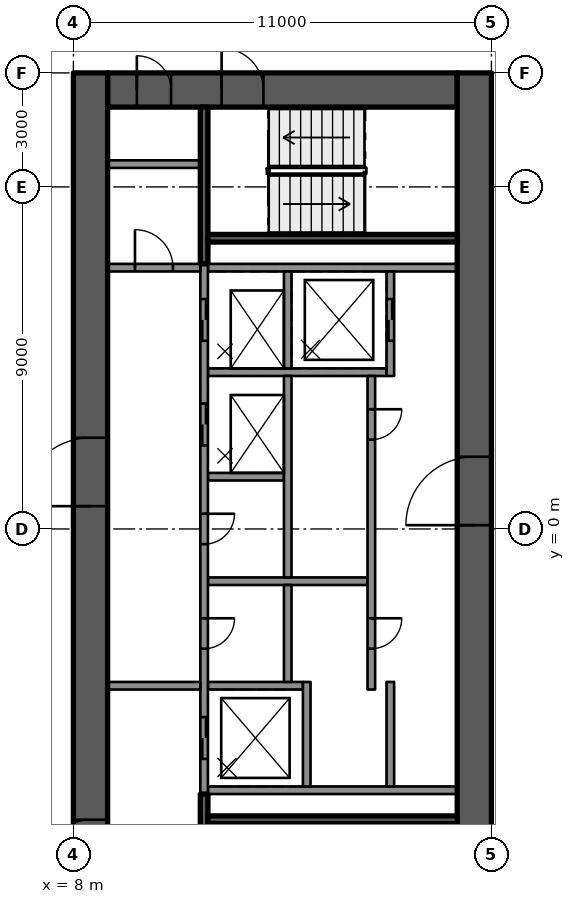
"""IFC4 building model, lengths in metres.
Left out: names, types, materials, properties, quantities, classifications, styles, units other than length and angle.
Written with IfcOpenShell. Run it as: python <this file> out.ifc"""

import sys

from ifc_helpers import new_model, si_unit, direction, frame, frame_2d, origin, place, context, subcontext, project, spatial, rectangle, extrude, element, fill, save


model = new_model("IFC4")
c1 = context("Model", 3, precision=1e-05, world=origin(), true_north=direction((0.0, 1.0)))
c2 = subcontext(c1, "Body", "Model", "MODEL_VIEW")
j1 = project(units=[si_unit("LENGTHUNIT", "METRE"), si_unit("PLANEANGLEUNIT", "RADIAN")], contexts=[c1])
p1 = place(None, origin())
s1 = spatial("IfcSite", under=j1, at=p1, CompositionType="ELEMENT")
p2 = place(p1, origin())
s2 = spatial("IfcBuilding", under=s1, at=p2, CompositionType="ELEMENT")
p3 = place(p2, frame((0.0, 0.0, 285.9)))
s3 = spatial("IfcBuildingStorey", under=s2, at=p3, CompositionType="ELEMENT", Elevation=285.9)
p4 = place(p3, frame((8.9, 11.55, 0.0), z_axis=(0.0, 0.0, 1.0), x_axis=(1.0, 0.0, 0.0)))
e1 = element("IfcWall", 1, at=p4, inside=s3, PredefinedType="SHEAR", context=c2, shape_type="SweptSolid", body=[
    extrude(rectangle(XDim=9.2, YDim=0.9, at=frame_2d((4.6, 0.0))), origin(), (0.0, 0.0, 1.0), 3.5),
])
p5 = place(p4, frame((3.0, 0.0, 0.0)))
e2 = element("IfcOpeningElement", 2, at=p5, cuts=e1, PredefinedType="OPENING", context=c2, shape_type="SweptSolid", body=[
    extrude(rectangle(XDim=1.1, YDim=2.1, at=frame_2d((0.55, 1.05))), frame((0.0, 0.46, 0.0), z_axis=(0.0, -1.0, 0.0), x_axis=(1.0, 0.0, 0.0)), (0.0, 0.0, 1.0), 0.92),
])
p6 = place(p4, frame((0.77, 0.0, 0.0)))
e3 = element("IfcOpeningElement", 3, at=p6, cuts=e1, PredefinedType="OPENING", context=c2, shape_type="SweptSolid", body=[
    extrude(rectangle(XDim=0.9, YDim=2.1, at=frame_2d((0.45, 1.05))), frame((0.0, 0.46, 0.0), z_axis=(0.0, -1.0, 0.0), x_axis=(1.0, 0.0, 0.0)), (0.0, 0.0, 1.0), 0.92),
])
p7 = place(p3, frame((8.45, -12.0, 0.0), z_axis=(0.0, 0.0, 1.0), x_axis=(0.0, 1.0, 0.0)))
e4 = element("IfcWall", 4, at=p7, inside=s3, PredefinedType="SHEAR", context=c2, shape_type="SweptSolid", body=[
    extrude(rectangle(XDim=24.0, YDim=0.9, at=frame_2d((12.0, 0.0))), origin(), (0.0, 0.0, 1.0), 3.5),
])
p8 = place(p7, frame((12.6, 0.0, 0.0)))
e5 = element("IfcOpeningElement", 5, at=p8, cuts=e4, PredefinedType="OPENING", context=c2, shape_type="SweptSolid", body=[
    extrude(rectangle(XDim=1.8, YDim=2.1, at=frame_2d((0.9, 1.05))), frame((0.0, 0.46, 0.0), z_axis=(0.0, -1.0, 0.0), x_axis=(1.0, 0.0, 0.0)), (0.0, 0.0, 1.0), 0.92),
])
p9 = place(p7, frame((3.25, 0.0, 0.0)))
e6 = element("IfcOpeningElement", 6, at=p9, cuts=e4, PredefinedType="OPENING", context=c2, shape_type="SweptSolid", body=[
    extrude(rectangle(XDim=1.1, YDim=2.1, at=frame_2d((0.55, 1.05))), frame((0.0, 0.46, 0.0), z_axis=(0.0, -1.0, 0.0), x_axis=(1.0, 0.0, 0.0)), (0.0, 0.0, 1.0), 0.92),
])
p10 = place(p3, frame((18.55, -12.0, 0.0), z_axis=(0.0, 0.0, 1.0), x_axis=(0.0, 1.0, 0.0)))
e7 = element("IfcWall", 7, at=p10, inside=s3, PredefinedType="SHEAR", context=c2, shape_type="SweptSolid", body=[
    extrude(rectangle(XDim=24.0, YDim=0.9, at=frame_2d((12.0, 0.0))), origin(), (0.0, 0.0, 1.0), 3.5),
])
p11 = place(p10, frame((12.1, 0.0, 0.0)))
e8 = element("IfcOpeningElement", 8, at=p11, cuts=e7, PredefinedType="OPENING", context=c2, shape_type="SweptSolid", body=[
    extrude(rectangle(XDim=1.8, YDim=2.1, at=frame_2d((0.9, 1.05))), frame((0.0, 0.46, 0.0), z_axis=(0.0, -1.0, 0.0), x_axis=(1.0, 0.0, 0.0)), (0.0, 0.0, 1.0), 0.92),
])
for number, where, z_axis, x_axis in (
    (9, (11.54, -6.875, 0.0), (0.0, 0.0, 1.0), (1.0, 0.0, 0.0)),
    (10, (11.54, 6.875, 0.0), (0.0, 0.0, 1.0), (1.0, 0.0, 0.0)),
):
    element("IfcWall", number, at=place(p3, frame(where, z_axis=z_axis, x_axis=x_axis)), inside=s3, PredefinedType="SOLIDWALL", context=c2, shape_type="SweptSolid", body=[
        extrude(rectangle(XDim=6.56, YDim=0.2, at=frame_2d((3.28, 0.0))), origin(), (0.0, 0.0, 1.0), 3.09),
    ])
p12 = place(p3, frame((11.54, 4.125, 0.0), z_axis=(0.0, 0.0, 1.0), x_axis=(1.0, 0.0, 0.0)))
e11 = element("IfcWall", 11, at=p12, inside=s3, PredefinedType="SOLIDWALL", context=c2, shape_type="SweptSolid", body=[
    extrude(rectangle(XDim=4.7, YDim=0.2, at=frame_2d((2.35, 0.0))), origin(), (0.0, 0.0, 1.0), 3.09),
])
p13 = place(p3, frame((11.54, 1.375, 0.0), z_axis=(0.0, 0.0, 1.0), x_axis=(1.0, 0.0, 0.0)))
e12 = element("IfcWall", 12, at=p13, inside=s3, PredefinedType="SOLIDWALL", context=c2, shape_type="SweptSolid", body=[
    extrude(rectangle(XDim=2.0, YDim=0.2, at=frame_2d((1.0, 0.0))), origin(), (0.0, 0.0, 1.0), 3.09),
])
p14 = place(p3, frame((11.54, -1.375, 0.0), z_axis=(0.0, 0.0, 1.0), x_axis=(1.0, 0.0, 0.0)))
e13 = element("IfcWall", 13, at=p14, inside=s3, PredefinedType="SOLIDWALL", context=c2, shape_type="SweptSolid", body=[
    extrude(rectangle(XDim=4.2, YDim=0.2, at=frame_2d((2.1, 0.0))), origin(), (0.0, 0.0, 1.0), 3.09),
])
p15 = place(p3, frame((11.54, -4.125, 0.0), z_axis=(0.0, 0.0, 1.0), x_axis=(1.0, 0.0, 0.0)))
e14 = element("IfcWall", 14, at=p15, inside=s3, PredefinedType="SOLIDWALL", context=c2, shape_type="SweptSolid", body=[
    extrude(rectangle(XDim=2.5, YDim=0.2, at=frame_2d((1.25, 0.0))), origin(), (0.0, 0.0, 1.0), 3.09),
])
p16 = place(p3, frame((11.44, 6.975, 0.0), z_axis=(0.0, 0.0, 1.0), x_axis=(0.0, -1.0, 0.0)))
e15 = element("IfcWall", 15, at=p16, inside=s3, PredefinedType="SOLIDWALL", context=c2, shape_type="SweptSolid", body=[
    extrude(rectangle(XDim=13.95, YDim=0.2, at=frame_2d((6.975, 0.0))), origin(), (0.0, 0.0, 1.0), 3.09),
])
p17 = place(p16, frame((0.925, 0.0, 0.0)))
e16 = element("IfcOpeningElement", 16, at=p17, cuts=e15, PredefinedType="OPENING", context=c2, shape_type="SweptSolid", body=[
    extrude(rectangle(XDim=1.1, YDim=2.1, at=frame_2d((0.55, 1.05))), frame((0.0, 0.11, 0.0), z_axis=(0.0, -1.0, 0.0), x_axis=(1.0, 0.0, 0.0)), (0.0, 0.0, 1.0), 0.22),
])
p18 = place(p16, frame((3.675, 0.0, 0.0)))
e17 = element("IfcOpeningElement", 17, at=p18, cuts=e15, PredefinedType="OPENING", context=c2, shape_type="SweptSolid", body=[
    extrude(rectangle(XDim=1.1, YDim=2.1, at=frame_2d((0.55, 1.05))), frame((0.0, 0.11, 0.0), z_axis=(0.0, -1.0, 0.0), x_axis=(1.0, 0.0, 0.0)), (0.0, 0.0, 1.0), 0.22),
])
p19 = place(p16, frame((11.925, 0.0, 0.0)))
e18 = element("IfcOpeningElement", 18, at=p19, cuts=e15, PredefinedType="OPENING", context=c2, shape_type="SweptSolid", body=[
    extrude(rectangle(XDim=1.1, YDim=2.1, at=frame_2d((0.55, 1.05))), frame((0.0, 0.11, 0.0), z_axis=(0.0, -1.0, 0.0), x_axis=(1.0, 0.0, 0.0)), (0.0, 0.0, 1.0), 0.22),
])
p20 = place(p16, frame((6.575, 0.0, 0.0)))
e19 = element("IfcOpeningElement", 19, at=p20, cuts=e15, PredefinedType="OPENING", context=c2, shape_type="SweptSolid", body=[
    extrude(rectangle(XDim=0.8, YDim=2.1, at=frame_2d((0.4, 1.05))), frame((0.0, 0.11, 0.0), z_axis=(0.0, -1.0, 0.0), x_axis=(1.0, 0.0, 0.0)), (0.0, 0.0, 1.0), 0.22),
])
p21 = place(p16, frame((9.325, 0.0, 0.0)))
e20 = element("IfcOpeningElement", 20, at=p21, cuts=e15, PredefinedType="OPENING", context=c2, shape_type="SweptSolid", body=[
    extrude(rectangle(XDim=0.8, YDim=2.1, at=frame_2d((0.4, 1.05))), frame((0.0, 0.11, 0.0), z_axis=(0.0, -1.0, 0.0), x_axis=(1.0, 0.0, 0.0)), (0.0, 0.0, 1.0), 0.22),
])
p22 = place(p3, frame((13.64, 6.775, 0.0), z_axis=(0.0, 0.0, 1.0), x_axis=(0.0, -1.0, 0.0)))
e21 = element("IfcWall", 21, at=p22, inside=s3, PredefinedType="SOLIDWALL", context=c2, shape_type="SweptSolid", body=[
    extrude(rectangle(XDim=2.55, YDim=0.2, at=frame_2d((1.275, 0.0))), origin(), (0.0, 0.0, 1.0), 3.09),
])
p23 = place(p3, frame((13.64, 4.025, 0.0), z_axis=(0.0, 0.0, 1.0), x_axis=(0.0, -1.0, 0.0)))
e22 = element("IfcWall", 22, at=p23, inside=s3, PredefinedType="SOLIDWALL", context=c2, shape_type="SweptSolid", body=[
    extrude(rectangle(XDim=5.3, YDim=0.2, at=frame_2d((2.65, 0.0))), origin(), (0.0, 0.0, 1.0), 3.09),
])
p24 = place(p3, frame((13.64, -1.475, 0.0), z_axis=(0.0, 0.0, 1.0), x_axis=(0.0, -1.0, 0.0)))
e23 = element("IfcWall", 23, at=p24, inside=s3, PredefinedType="SOLIDWALL", context=c2, shape_type="SweptSolid", body=[
    extrude(rectangle(XDim=2.55, YDim=0.2, at=frame_2d((1.275, 0.0))), origin(), (0.0, 0.0, 1.0), 3.09),
])
p25 = place(p3, frame((14.14, -4.025, 0.0), z_axis=(0.0, 0.0, 1.0), x_axis=(0.0, -1.0, 0.0)))
e24 = element("IfcWall", 24, at=p25, inside=s3, PredefinedType="SOLIDWALL", context=c2, shape_type="SweptSolid", body=[
    extrude(rectangle(XDim=2.75, YDim=0.2, at=frame_2d((1.375, 0.0))), origin(), (0.0, 0.0, 1.0), 3.09),
])
p26 = place(p3, frame((16.34, 6.775, 0.0), z_axis=(0.0, 0.0, 1.0), x_axis=(0.0, -1.0, 0.0)))
e25 = element("IfcWall", 25, at=p26, inside=s3, PredefinedType="SOLIDWALL", context=c2, shape_type="SweptSolid", body=[
    extrude(rectangle(XDim=2.75, YDim=0.2, at=frame_2d((1.375, 0.0))), origin(), (0.0, 0.0, 1.0), 3.09),
])
p27 = place(p26, frame((0.725, 0.0, 0.0)))
e26 = element("IfcOpeningElement", 26, at=p27, cuts=e25, PredefinedType="OPENING", context=c2, shape_type="SweptSolid", body=[
    extrude(rectangle(XDim=1.1, YDim=2.1, at=frame_2d((0.55, 1.05))), frame((0.0, 0.11, 0.0), z_axis=(0.0, -1.0, 0.0), x_axis=(1.0, 0.0, 0.0)), (0.0, 0.0, 1.0), 0.22),
])
p28 = place(p3, frame((15.84, 4.025, 0.0), z_axis=(0.0, 0.0, 1.0), x_axis=(0.0, -1.0, 0.0)))
e27 = element("IfcWall", 27, at=p28, inside=s3, PredefinedType="SOLIDWALL", context=c2, shape_type="SweptSolid", body=[
    extrude(rectangle(XDim=8.25, YDim=0.2, at=frame_2d((4.125, 0.0))), origin(), (0.0, 0.0, 1.0), 3.09),
])
p29 = place(p28, frame((0.875, 0.0, 0.0)))
e28 = element("IfcOpeningElement", 28, at=p29, cuts=e27, PredefinedType="OPENING", context=c2, shape_type="SweptSolid", body=[
    extrude(rectangle(XDim=0.8, YDim=2.1, at=frame_2d((0.4, 1.05))), frame((0.0, 0.11, 0.0), z_axis=(0.0, -1.0, 0.0), x_axis=(1.0, 0.0, 0.0)), (0.0, 0.0, 1.0), 0.22),
])
p30 = place(p28, frame((6.375, 0.0, 0.0)))
e29 = element("IfcOpeningElement", 29, at=p30, cuts=e27, PredefinedType="OPENING", context=c2, shape_type="SweptSolid", body=[
    extrude(rectangle(XDim=0.8, YDim=2.1, at=frame_2d((0.4, 1.05))), frame((0.0, 0.11, 0.0), z_axis=(0.0, -1.0, 0.0), x_axis=(1.0, 0.0, 0.0)), (0.0, 0.0, 1.0), 0.22),
])
p31 = place(p3, frame((16.34, -4.025, 0.0), z_axis=(0.0, 0.0, 1.0), x_axis=(0.0, -1.0, 0.0)))
e30 = element("IfcWall", 30, at=p31, inside=s3, PredefinedType="SOLIDWALL", context=c2, shape_type="SweptSolid", body=[
    extrude(rectangle(XDim=2.75, YDim=0.2, at=frame_2d((1.375, 0.0))), origin(), (0.0, 0.0, 1.0), 3.09),
])
p32 = place(p3, frame((11.44, -6.975, 0.0), z_axis=(0.0, 0.0, 1.0), x_axis=(0.0, -1.0, 0.0)))
e31 = element("IfcWall", 31, at=p32, inside=s3, PredefinedType="SOLIDWALL", context=c2, shape_type="SweptSolid", body=[
    extrude(rectangle(XDim=4.125, YDim=0.2, at=frame_2d((2.062, 0.0))), origin(), (0.0, 0.0, 1.0), 3.09),
])
p33 = place(p32, frame((2.1, 0.0, 0.0)))
e32 = element("IfcOpeningElement", 32, at=p33, cuts=e31, PredefinedType="OPENING", context=c2, shape_type="SweptSolid", body=[
    extrude(rectangle(XDim=1.1, YDim=2.1, at=frame_2d((0.55, 1.05))), frame((0.0, 0.11, 0.0), z_axis=(0.0, -1.0, 0.0), x_axis=(1.0, 0.0, 0.0)), (0.0, 0.0, 1.0), 0.22),
])
p34 = place(p3, frame((11.54, -7.65, 0.0), z_axis=(0.0, 0.0, 1.0), x_axis=(1.0, 0.0, 0.0)))
e33 = element("IfcWall", 33, at=p34, inside=s3, PredefinedType="SOLIDWALL", context=c2, shape_type="SweptSolid", body=[
    extrude(rectangle(XDim=6.56, YDim=0.2, at=frame_2d((3.28, 0.0))), origin(), (0.0, 0.0, 1.0), 3.09),
])
p35 = place(p3, frame((11.44, 11.1, 0.0), z_axis=(0.0, 0.0, 1.0), x_axis=(0.0, -1.0, 0.0)))
e34 = element("IfcWall", 34, at=p35, inside=s3, PredefinedType="SOLIDWALL", context=c2, shape_type="SweptSolid", body=[
    extrude(rectangle(XDim=4.125, YDim=0.2, at=frame_2d((2.062, 0.0))), origin(), (0.0, 0.0, 1.0), 3.09),
])
p36 = place(p3, frame((11.54, 7.65, 0.0), z_axis=(0.0, 0.0, 1.0), x_axis=(1.0, 0.0, 0.0)))
e35 = element("IfcWall", 35, at=p36, inside=s3, PredefinedType="SOLIDWALL", context=c2, shape_type="SweptSolid", body=[
    extrude(rectangle(XDim=6.56, YDim=0.2, at=frame_2d((3.28, 0.0))), origin(), (0.0, 0.0, 1.0), 3.09),
])
p37 = place(p3, frame((8.9, -4.125, 0.0), z_axis=(0.0, 0.0, 1.0), x_axis=(1.0, 0.0, 0.0)))
e36 = element("IfcWall", 36, at=p37, inside=s3, PredefinedType="PARTITIONING", context=c2, shape_type="SweptSolid", body=[
    extrude(rectangle(XDim=2.44, YDim=0.2, at=frame_2d((1.22, 0.0))), origin(), (0.0, 0.0, 1.0), 3.09),
])
p38 = place(p3, frame((8.9, 6.875, 0.0), z_axis=(0.0, 0.0, 1.0), x_axis=(1.0, 0.0, 0.0)))
e37 = element("IfcWall", 37, at=p38, inside=s3, PredefinedType="PARTITIONING", context=c2, shape_type="SweptSolid", body=[
    extrude(rectangle(XDim=2.44, YDim=0.2, at=frame_2d((1.22, 0.0))), origin(), (0.0, 0.0, 1.0), 3.09),
])
p39 = place(p38, frame((0.72, 0.0, 0.0)))
e38 = element("IfcOpeningElement", 38, at=p39, cuts=e37, PredefinedType="OPENING", context=c2, shape_type="SweptSolid", body=[
    extrude(rectangle(XDim=1.0, YDim=2.1, at=frame_2d((0.5, 1.05))), frame((0.0, 0.11, 0.0), z_axis=(0.0, -1.0, 0.0), x_axis=(1.0, 0.0, 0.0)), (0.0, 0.0, 1.0), 0.22),
])
p40 = place(p3, frame((8.9, 9.6, 0.0), z_axis=(0.0, 0.0, 1.0), x_axis=(1.0, 0.0, 0.0)))
e39 = element("IfcWall", 39, at=p40, inside=s3, PredefinedType="PARTITIONING", context=c2, shape_type="SweptSolid", body=[
    extrude(rectangle(XDim=2.44, YDim=0.2, at=frame_2d((1.22, 0.0))), origin(), (0.0, 0.0, 1.0), 3.09),
])
p41 = place(p17, origin())
e40 = element("IfcDoor", 40, at=p41, inside=s3, OperationType="DOUBLE_DOOR_SLIDING", PredefinedType="DOOR", context=c2, shape_type="SweptSolid", body=[
    extrude(rectangle(XDim=1.1, YDim=2.1, at=frame_2d((0.55, 1.05))), frame((0.0, 0.025, 0.0), z_axis=(0.0, -1.0, 0.0), x_axis=(1.0, 0.0, 0.0)), (0.0, 0.0, 1.0), 0.05),
])
fill(e16, e40)
p42 = place(p27, origin())
e41 = element("IfcDoor", 41, at=p42, inside=s3, OperationType="DOUBLE_DOOR_SLIDING", PredefinedType="DOOR", context=c2, shape_type="SweptSolid", body=[
    extrude(rectangle(XDim=1.1, YDim=2.1, at=frame_2d((0.55, 1.05))), frame((0.0, 0.025, 0.0), z_axis=(0.0, -1.0, 0.0), x_axis=(1.0, 0.0, 0.0)), (0.0, 0.0, 1.0), 0.05),
])
fill(e26, e41)
p43 = place(p18, origin())
e42 = element("IfcDoor", 42, at=p43, inside=s3, OperationType="DOUBLE_DOOR_SLIDING", PredefinedType="DOOR", context=c2, shape_type="SweptSolid", body=[
    extrude(rectangle(XDim=1.1, YDim=2.1, at=frame_2d((0.55, 1.05))), frame((0.0, 0.025, 0.0), z_axis=(0.0, -1.0, 0.0), x_axis=(1.0, 0.0, 0.0)), (0.0, 0.0, 1.0), 0.05),
])
fill(e17, e42)
p44 = place(p19, origin())
e43 = element("IfcDoor", 43, at=p44, inside=s3, OperationType="DOUBLE_DOOR_SLIDING", PredefinedType="DOOR", context=c2, shape_type="SweptSolid", body=[
    extrude(rectangle(XDim=1.1, YDim=2.1, at=frame_2d((0.55, 1.05))), frame((0.0, 0.025, 0.0), z_axis=(0.0, -1.0, 0.0), x_axis=(1.0, 0.0, 0.0)), (0.0, 0.0, 1.0), 0.05),
])
fill(e18, e43)
p45 = place(p29, origin())
e44 = element("IfcDoor", 44, at=p45, inside=s3, OperationType="SINGLE_SWING_LEFT", PredefinedType="DOOR", context=c2, shape_type="SweptSolid", body=[
    extrude(rectangle(XDim=0.8, YDim=2.1, at=frame_2d((0.4, 1.05))), frame((0.0, 0.025, 0.0), z_axis=(0.0, -1.0, 0.0), x_axis=(1.0, 0.0, 0.0)), (0.0, 0.0, 1.0), 0.05),
])
fill(e28, e44)
p46 = place(p20, origin())
e45 = element("IfcDoor", 45, at=p46, inside=s3, OperationType="SINGLE_SWING_LEFT", PredefinedType="DOOR", context=c2, shape_type="SweptSolid", body=[
    extrude(rectangle(XDim=0.8, YDim=2.1, at=frame_2d((0.4, 1.05))), frame((0.0, 0.025, 0.0), z_axis=(0.0, -1.0, 0.0), x_axis=(1.0, 0.0, 0.0)), (0.0, 0.0, 1.0), 0.05),
])
fill(e19, e45)
p47 = place(p21, origin())
e46 = element("IfcDoor", 46, at=p47, inside=s3, OperationType="SINGLE_SWING_LEFT", PredefinedType="DOOR", context=c2, shape_type="SweptSolid", body=[
    extrude(rectangle(XDim=0.8, YDim=2.1, at=frame_2d((0.4, 1.05))), frame((0.0, 0.025, 0.0), z_axis=(0.0, -1.0, 0.0), x_axis=(1.0, 0.0, 0.0)), (0.0, 0.0, 1.0), 0.05),
])
fill(e20, e46)
p48 = place(p30, origin())
e47 = element("IfcDoor", 47, at=p48, inside=s3, OperationType="SINGLE_SWING_LEFT", PredefinedType="DOOR", context=c2, shape_type="SweptSolid", body=[
    extrude(rectangle(XDim=0.8, YDim=2.1, at=frame_2d((0.4, 1.05))), frame((0.0, 0.025, 0.0), z_axis=(0.0, -1.0, 0.0), x_axis=(1.0, 0.0, 0.0)), (0.0, 0.0, 1.0), 0.05),
])
fill(e29, e47)
p49 = place(p8, origin())
e48 = element("IfcDoor", 48, at=p49, inside=s3, OperationType="SINGLE_SWING_RIGHT", PredefinedType="DOOR", context=c2, shape_type="SweptSolid", body=[
    extrude(rectangle(XDim=1.8, YDim=2.1, at=frame_2d((0.9, 1.05))), frame((0.0, 0.025, 0.0), z_axis=(0.0, -1.0, 0.0), x_axis=(1.0, 0.0, 0.0)), (0.0, 0.0, 1.0), 0.05),
])
fill(e5, e48)
p50 = place(p11, origin())
e49 = element("IfcDoor", 49, at=p50, inside=s3, OperationType="SINGLE_SWING_RIGHT", PredefinedType="DOOR", context=c2, shape_type="SweptSolid", body=[
    extrude(rectangle(XDim=1.8, YDim=2.1, at=frame_2d((0.9, 1.05))), frame((0.0, 0.025, 0.0), z_axis=(0.0, -1.0, 0.0), x_axis=(1.0, 0.0, 0.0)), (0.0, 0.0, 1.0), 0.05),
])
fill(e8, e49)
p51 = place(p9, origin())
e50 = element("IfcDoor", 50, at=p51, inside=s3, OperationType="SINGLE_SWING_LEFT", PredefinedType="DOOR", context=c2, shape_type="SweptSolid", body=[
    extrude(rectangle(XDim=1.1, YDim=2.1, at=frame_2d((0.55, 1.05))), frame((0.0, 0.025, 0.0), z_axis=(0.0, -1.0, 0.0), x_axis=(1.0, 0.0, 0.0)), (0.0, 0.0, 1.0), 0.05),
])
fill(e6, e50)
p52 = place(p5, origin())
e51 = element("IfcDoor", 51, at=p52, inside=s3, OperationType="SINGLE_SWING_LEFT", PredefinedType="DOOR", context=c2, shape_type="SweptSolid", body=[
    extrude(rectangle(XDim=1.1, YDim=2.1, at=frame_2d((0.55, 1.05))), frame((0.0, 0.025, 0.0), z_axis=(0.0, -1.0, 0.0), x_axis=(1.0, 0.0, 0.0)), (0.0, 0.0, 1.0), 0.05),
])
fill(e2, e51)
p53 = place(p6, origin())
e52 = element("IfcDoor", 52, at=p53, inside=s3, OperationType="SINGLE_SWING_LEFT", PredefinedType="DOOR", context=c2, shape_type="SweptSolid", body=[
    extrude(rectangle(XDim=0.9, YDim=2.1, at=frame_2d((0.45, 1.05))), frame((0.0, 0.025, 0.0), z_axis=(0.0, -1.0, 0.0), x_axis=(1.0, 0.0, 0.0)), (0.0, 0.0, 1.0), 0.05),
])
fill(e3, e52)
p54 = place(p39, origin())
e53 = element("IfcDoor", 53, at=p54, inside=s3, OperationType="SINGLE_SWING_RIGHT", PredefinedType="DOOR", context=c2, shape_type="SweptSolid", body=[
    extrude(rectangle(XDim=1.0, YDim=2.1, at=frame_2d((0.5, 1.05))), frame((0.0, 0.025, 0.0), z_axis=(0.0, -1.0, 0.0), x_axis=(1.0, 0.0, 0.0)), (0.0, 0.0, 1.0), 0.05),
])
fill(e38, e53)
save(model, sys.argv[1])
